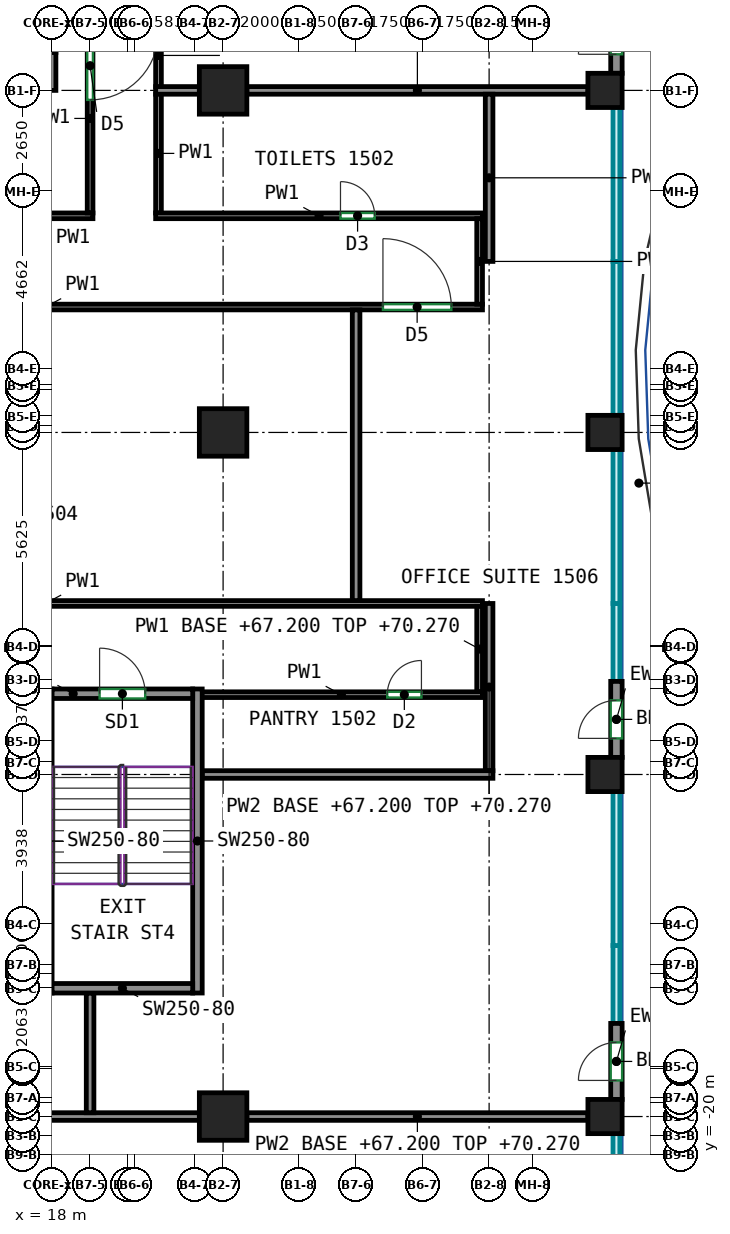
"""IFC4 building model, lengths in metres.
Left out: names, types, materials, properties, quantities, classifications, styles, units other than length and angle.
Written with IfcOpenShell. Run it as: python <this file> out.ifc"""

import sys

from ifc_helpers import new_model, si_unit, direction, frame, frame_2d, origin, origin_2d, place, context, subcontext, project, spatial, rectangle, extrude, source, transform, mapped, element, fill, save


model = new_model("IFC4")
c1 = context("Model", 3, precision=1e-05, world=origin(), true_north=direction((0.0, 1.0)))
c2 = subcontext(c1, "Body", "Model", "MODEL_VIEW")
j1 = project(units=[si_unit("LENGTHUNIT", "METRE"), si_unit("PLANEANGLEUNIT", "RADIAN")], contexts=[c1])
p1 = place(None, origin())
s1 = spatial("IfcSite", under=j1, at=p1, CompositionType="ELEMENT")
p2 = place(p1, origin())
s2 = spatial("IfcBuilding", under=s1, at=p2, CompositionType="ELEMENT")
p3 = place(p2, frame((0.0, 0.0, 67.2)))
s3 = spatial("IfcBuildingStorey", under=s2, at=p3, CompositionType="ELEMENT", Elevation=67.2)
m1 = source(origin(), c2, "Body", "SweptSolid", [
    extrude(rectangle(XDim=1.25, YDim=1.25, at=origin_2d()), origin(), (0.0, 0.0, 1.0), 3.72),
])
for number, where, z_axis, x_axis in (
    (1, (22.5, -19.0, 0.0), (0.0, 0.0, 1.0), (1.0, 0.0, 0.0)),
    (2, (22.5, -1.0, 0.0), (0.0, 0.0, 1.0), (1.0, 0.0, 0.0)),
    (3, (22.5, 8.0, 0.0), (0.0, 0.0, 1.0), (1.0, 0.0, 0.0)),
):
    element("IfcColumn", number, at=place(p3, frame(where, z_axis=z_axis, x_axis=x_axis)), inside=s3, PredefinedType="COLUMN", context=c2, shape_type="MappedRepresentation", body=[
        mapped(m1, transform((0.0, 0.0, 0.0))),
    ])
m2 = source(origin(), c2, "Body", "SweptSolid", [
    extrude(rectangle(XDim=0.9, YDim=0.9, at=origin_2d()), origin(), (0.0, 0.0, 1.0), 3.72),
])
for number, where, z_axis, x_axis in (
    (4, (32.55, -19.0, 0.0), (0.0, 0.0, 1.0), (1.0, 0.0, 0.0)),
    (5, (32.55, -10.0, 0.0), (0.0, 0.0, 1.0), (1.0, 0.0, 0.0)),
    (6, (32.55, -1.0, 0.0), (0.0, 0.0, 1.0), (1.0, 0.0, 0.0)),
    (7, (32.55, 8.0, 0.0), (0.0, 0.0, 1.0), (1.0, 0.0, 0.0)),
):
    element("IfcColumn", number, at=place(p3, frame(where, z_axis=z_axis, x_axis=x_axis)), inside=s3, PredefinedType="COLUMN", context=c2, shape_type="MappedRepresentation", body=[
        mapped(m2, transform((0.0, 0.0, 0.0))),
    ])
m3 = source(origin(), c2, "Body", "SweptSolid", [
    extrude(rectangle(XDim=5.63, YDim=1.0, at=frame_2d((2.815, 0.0))), origin(), (0.0, 0.0, 1.0), 3.72),
])
p4 = place(p3, frame((12.47, 8.5, 0.0), z_axis=(0.0, 0.0, 1.0), x_axis=(1.0, 0.0, 0.0)))
e8 = element("IfcWall", 8, at=p4, inside=s3, PredefinedType="SHEAR", context=c2, shape_type="MappedRepresentation", body=[
    mapped(m3, transform((0.0, 0.0, 0.0))),
])
p5 = place(p4, frame((2.18, 0.0, 0.0)))
e9 = element("IfcOpeningElement", 9, at=p5, cuts=e8, PredefinedType="OPENING", context=c2, shape_type="SweptSolid", body=[
    extrude(rectangle(XDim=1.2, YDim=2.1, at=frame_2d((0.6, 1.05))), frame((0.0, 0.51, 0.0), z_axis=(0.0, -1.0, 0.0), x_axis=(1.0, 0.0, 0.0)), (0.0, 0.0, 1.0), 1.02),
])
m4 = source(origin(), c2, "Body", "SweptSolid", [
    extrude(rectangle(XDim=8.0, YDim=0.25, at=frame_2d((4.0, 0.0))), origin(), (0.0, 0.0, 1.0), 3.72),
])
p6 = place(p3, frame((21.825, -15.75, 0.0), z_axis=(0.0, 0.0, 1.0), x_axis=(0.0, 1.0, 0.0)))
e10 = element("IfcWall", 10, at=p6, inside=s3, PredefinedType="SHEAR", context=c2, shape_type="MappedRepresentation", body=[
    mapped(m4, transform((0.0, 0.0, 0.0))),
])
m5 = source(origin(), c2, "Body", "SweptSolid", [
    extrude(rectangle(XDim=3.7, YDim=0.25, at=frame_2d((1.85, 0.0))), origin(), (0.0, 0.0, 1.0), 3.72),
])
p7 = place(p3, frame((18.0, -15.625, 0.0), z_axis=(0.0, 0.0, 1.0), x_axis=(1.0, 0.0, 0.0)))
e11 = element("IfcWall", 11, at=p7, inside=s3, PredefinedType="SHEAR", context=c2, shape_type="MappedRepresentation", body=[
    mapped(m5, transform((0.0, 0.0, 0.0))),
])
p8 = place(p3, frame((18.0, -7.875, 0.0), z_axis=(0.0, 0.0, 1.0), x_axis=(1.0, 0.0, 0.0)))
e12 = element("IfcWall", 12, at=p8, inside=s3, PredefinedType="SHEAR", context=c2, shape_type="MappedRepresentation", body=[
    mapped(m5, transform((0.0, 0.0, 0.0))),
])
p9 = place(p8, frame((1.25, 0.0, 0.0)))
e13 = element("IfcOpeningElement", 13, at=p9, cuts=e12, PredefinedType="OPENING", context=c2, shape_type="SweptSolid", body=[
    extrude(rectangle(XDim=1.2, YDim=2.1, at=frame_2d((0.6, 1.05))), frame((0.0, 0.135, 0.0), z_axis=(0.0, -1.0, 0.0), x_axis=(1.0, 0.0, 0.0)), (0.0, 0.0, 1.0), 0.27),
])
m6 = source(origin(), c2, "Body", "SweptSolid", [
    extrude(rectangle(XDim=2.0, YDim=0.3, at=frame_2d((1.0, 0.0))), origin(), (0.0, 0.0, 1.0), 3.72),
])
p10 = place(p3, frame((32.85, -18.55, 0.0), z_axis=(0.0, 0.0, 1.0), x_axis=(0.0, 1.0, 0.0)))
e14 = element("IfcWall", 14, at=p10, inside=s3, PredefinedType="SOLIDWALL", context=c2, shape_type="MappedRepresentation", body=[
    mapped(m6, transform((0.0, 0.0, 0.0))),
])
p11 = place(p10, frame((0.5, 0.0, 0.0)))
e15 = element("IfcOpeningElement", 15, at=p11, cuts=e14, PredefinedType="OPENING", context=c2, shape_type="SweptSolid", body=[
    extrude(rectangle(XDim=1.0, YDim=2.1, at=frame_2d((0.5, 1.05))), frame((0.0, 0.16, 0.0), z_axis=(0.0, -1.0, 0.0), x_axis=(1.0, 0.0, 0.0)), (0.0, 0.0, 1.0), 0.32),
])
p12 = place(p3, frame((32.85, -9.55, 0.0), z_axis=(0.0, 0.0, 1.0), x_axis=(0.0, 1.0, 0.0)))
e16 = element("IfcWall", 16, at=p12, inside=s3, PredefinedType="SOLIDWALL", context=c2, shape_type="MappedRepresentation", body=[
    mapped(m6, transform((0.0, 0.0, 0.0))),
])
p13 = place(p12, frame((0.5, 0.0, 0.0)))
e17 = element("IfcOpeningElement", 17, at=p13, cuts=e16, PredefinedType="OPENING", context=c2, shape_type="SweptSolid", body=[
    extrude(rectangle(XDim=1.0, YDim=2.1, at=frame_2d((0.5, 1.05))), frame((0.0, 0.16, 0.0), z_axis=(0.0, -1.0, 0.0), x_axis=(1.0, 0.0, 0.0)), (0.0, 0.0, 1.0), 0.32),
])
p14 = place(p3, frame((32.85, 8.45, 0.0), z_axis=(0.0, 0.0, 1.0), x_axis=(0.0, 1.0, 0.0)))
e18 = element("IfcWall", 18, at=p14, inside=s3, PredefinedType="SOLIDWALL", context=c2, shape_type="MappedRepresentation", body=[
    mapped(m6, transform((0.0, 0.0, 0.0))),
])
p15 = place(p14, frame((0.5, 0.0, 0.0)))
e19 = element("IfcOpeningElement", 19, at=p15, cuts=e18, PredefinedType="OPENING", context=c2, shape_type="SweptSolid", body=[
    extrude(rectangle(XDim=1.0, YDim=2.1, at=frame_2d((0.5, 1.05))), frame((0.0, 0.16, 0.0), z_axis=(0.0, -1.0, 0.0), x_axis=(1.0, 0.0, 0.0)), (0.0, 0.0, 1.0), 0.32),
])
p16 = place(p3, frame((6.325, 2.3, 0.0), z_axis=(0.0, 0.0, 1.0), x_axis=(1.0, 0.0, 0.0)))
e20 = element("IfcWall", 20, at=p16, inside=s3, PredefinedType="PARTITIONING", context=c2, shape_type="SweptSolid", body=[
    extrude(rectangle(XDim=23.0, YDim=0.15, at=frame_2d((11.5, 0.0))), origin(), (0.0, 0.0, 1.0), 3.72),
])
p17 = place(p16, frame((9.443, 0.0, 0.0)))
e21 = element("IfcOpeningElement", 21, at=p17, cuts=e20, PredefinedType="OPENING", context=c2, shape_type="SweptSolid", body=[
    extrude(rectangle(XDim=1.0, YDim=2.1, at=frame_2d((0.5, 1.05))), frame((0.0, 0.085, 0.0), z_axis=(0.0, -1.0, 0.0), x_axis=(1.0, 0.0, 0.0)), (0.0, 0.0, 1.0), 0.17),
])
p18 = place(p16, frame((20.381, 0.0, 0.0)))
e22 = element("IfcOpeningElement", 22, at=p18, cuts=e20, PredefinedType="OPENING", context=c2, shape_type="SweptSolid", body=[
    extrude(rectangle(XDim=1.8, YDim=2.1, at=frame_2d((0.9, 1.05))), frame((0.0, 0.085, 0.0), z_axis=(0.0, -1.0, 0.0), x_axis=(1.0, 0.0, 0.0)), (0.0, 0.0, 1.0), 0.17),
])
p19 = place(p3, frame((6.325, -5.5, 0.0), z_axis=(0.0, 0.0, 1.0), x_axis=(1.0, 0.0, 0.0)))
e23 = element("IfcWall", 23, at=p19, inside=s3, PredefinedType="PARTITIONING", context=c2, shape_type="SweptSolid", body=[
    extrude(rectangle(XDim=23.0, YDim=0.15, at=frame_2d((11.5, 0.0))), origin(), (0.0, 0.0, 1.0), 3.72),
])
p20 = place(p3, frame((16.075, 4.7, 0.0), z_axis=(0.0, 0.0, 1.0), x_axis=(1.0, 0.0, 0.0)))
e24 = element("IfcWall", 24, at=p20, inside=s3, PredefinedType="PARTITIONING", context=c2, shape_type="SweptSolid", body=[
    extrude(rectangle(XDim=3.0, YDim=0.15, at=frame_2d((1.5, 0.0))), origin(), (0.0, 0.0, 1.0), 3.72),
])
p21 = place(p3, frame((19.0, 9.75, 0.0), z_axis=(0.0, 0.0, 1.0), x_axis=(0.0, -1.0, 0.0)))
e25 = element("IfcWall", 25, at=p21, inside=s3, PredefinedType="PARTITIONING", context=c2, shape_type="SweptSolid", body=[
    extrude(rectangle(XDim=4.975, YDim=0.15, at=frame_2d((2.488, 0.0))), origin(), (0.0, 0.0, 1.0), 3.72),
])
p22 = place(p21, frame((0.2, 0.0, 0.0)))
e26 = element("IfcOpeningElement", 26, at=p22, cuts=e25, PredefinedType="OPENING", context=c2, shape_type="SweptSolid", body=[
    extrude(rectangle(XDim=1.8, YDim=2.1, at=frame_2d((0.9, 1.05))), frame((0.0, 0.085, 0.0), z_axis=(0.0, -1.0, 0.0), x_axis=(1.0, 0.0, 0.0)), (0.0, 0.0, 1.0), 0.17),
])
p23 = place(p3, frame((20.8, 8.09, 0.0), z_axis=(0.0, 0.0, 1.0), x_axis=(0.0, 1.0, 0.0)))
e27 = element("IfcWall", 27, at=p23, inside=s3, PredefinedType="PARTITIONING", context=c2, shape_type="SweptSolid", body=[
    extrude(rectangle(XDim=1.66, YDim=0.15, at=frame_2d((0.83, 0.0))), origin(), (0.0, 0.0, 1.0), 3.72),
])
p24 = place(p3, frame((20.8, 4.775, 0.0), z_axis=(0.0, 0.0, 1.0), x_axis=(0.0, 1.0, 0.0)))
e28 = element("IfcWall", 28, at=p24, inside=s3, PredefinedType="PARTITIONING", context=c2, shape_type="SweptSolid", body=[
    extrude(rectangle(XDim=3.135, YDim=0.15, at=frame_2d((1.567, 0.0))), origin(), (0.0, 0.0, 1.0), 3.72),
])
p25 = place(p3, frame((20.725, 4.7, 0.0), z_axis=(0.0, 0.0, 1.0), x_axis=(1.0, 0.0, 0.0)))
e29 = element("IfcWall", 29, at=p25, inside=s3, PredefinedType="PARTITIONING", context=c2, shape_type="SweptSolid", body=[
    extrude(rectangle(XDim=8.6, YDim=0.15, at=frame_2d((4.3, 0.0))), origin(), (0.0, 0.0, 1.0), 3.72),
])
p26 = place(p25, frame((4.864, 0.0, 0.0)))
e30 = element("IfcOpeningElement", 30, at=p26, cuts=e29, PredefinedType="OPENING", context=c2, shape_type="SweptSolid", body=[
    extrude(rectangle(XDim=0.9, YDim=2.1, at=frame_2d((0.45, 1.05))), frame((0.0, 0.085, 0.0), z_axis=(0.0, -1.0, 0.0), x_axis=(1.0, 0.0, 0.0)), (0.0, 0.0, 1.0), 0.17),
])
p27 = place(p3, frame((29.25, -7.825, 0.0), z_axis=(0.0, 0.0, 1.0), x_axis=(0.0, 1.0, 0.0)))
e31 = element("IfcWall", 31, at=p27, inside=s3, PredefinedType="PARTITIONING", context=c2, shape_type="SweptSolid", body=[
    extrude(rectangle(XDim=2.25, YDim=0.15, at=frame_2d((1.125, 0.0))), origin(), (0.0, 0.0, 1.0), 3.07),
])
p28 = place(p3, frame((21.9, -7.9, 0.0), z_axis=(0.0, 0.0, 1.0), x_axis=(1.0, 0.0, 0.0)))
e32 = element("IfcWall", 32, at=p28, inside=s3, PredefinedType="PARTITIONING", context=c2, shape_type="SweptSolid", body=[
    extrude(rectangle(XDim=7.425, YDim=0.15, at=frame_2d((3.712, 0.0))), origin(), (0.0, 0.0, 1.0), 3.72),
])
p29 = place(p28, frame((4.919, 0.0, 0.0)))
e33 = element("IfcOpeningElement", 33, at=p29, cuts=e32, PredefinedType="OPENING", context=c2, shape_type="SweptSolid", body=[
    extrude(rectangle(XDim=0.9, YDim=2.1, at=frame_2d((0.45, 1.05))), frame((0.0, 0.085, 0.0), z_axis=(0.0, -1.0, 0.0), x_axis=(1.0, 0.0, 0.0)), (0.0, 0.0, 1.0), 0.17),
])
p30 = place(p3, frame((29.25, 2.375, 0.0), z_axis=(0.0, 0.0, 1.0), x_axis=(0.0, 1.0, 0.0)))
e34 = element("IfcWall", 34, at=p30, inside=s3, PredefinedType="PARTITIONING", context=c2, shape_type="SweptSolid", body=[
    extrude(rectangle(XDim=2.25, YDim=0.15, at=frame_2d((1.125, 0.0))), origin(), (0.0, 0.0, 1.0), 3.07),
])
p31 = place(p3, frame((16.125, -19.0, 0.0), z_axis=(0.0, 0.0, 1.0), x_axis=(1.0, 0.0, 0.0)))
e35 = element("IfcWall", 35, at=p31, inside=s3, PredefinedType="PARTITIONING", context=c2, shape_type="SweptSolid", body=[
    extrude(rectangle(XDim=5.75, YDim=0.2, at=frame_2d((2.875, 0.0))), origin(), (0.0, 0.0, 1.0), 3.72),
])
p32 = place(p3, frame((23.125, -19.0, 0.0), z_axis=(0.0, 0.0, 1.0), x_axis=(1.0, 0.0, 0.0)))
e36 = element("IfcWall", 36, at=p32, inside=s3, PredefinedType="PARTITIONING", context=c2, shape_type="SweptSolid", body=[
    extrude(rectangle(XDim=8.975, YDim=0.2, at=frame_2d((4.488, 0.0))), origin(), (0.0, 0.0, 1.0), 3.07),
])
p33 = place(p3, frame((26.0, -5.424, 0.0), z_axis=(0.0, 0.0, 1.0), x_axis=(0.0, 1.0, 0.0)))
e37 = element("IfcWall", 37, at=p33, inside=s3, PredefinedType="PARTITIONING", context=c2, shape_type="SweptSolid", body=[
    extrude(rectangle(XDim=7.648, YDim=0.2, at=frame_2d((3.824, 0.0))), origin(), (0.0, 0.0, 1.0), 3.72),
])
p34 = place(p3, frame((19.0, -18.9, 0.0), z_axis=(0.0, 0.0, 1.0), x_axis=(0.0, 1.0, 0.0)))
e38 = element("IfcWall", 38, at=p34, inside=s3, PredefinedType="PARTITIONING", context=c2, shape_type="SweptSolid", body=[
    extrude(rectangle(XDim=3.15, YDim=0.2, at=frame_2d((1.575, 0.0))), origin(), (0.0, 0.0, 1.0), 3.72),
])
p35 = place(p3, frame((23.125, 8.0, 0.0), z_axis=(0.0, 0.0, 1.0), x_axis=(1.0, 0.0, 0.0)))
e39 = element("IfcWall", 39, at=p35, inside=s3, PredefinedType="PARTITIONING", context=c2, shape_type="SweptSolid", body=[
    extrude(rectangle(XDim=8.975, YDim=0.2, at=frame_2d((4.488, 0.0))), origin(), (0.0, 0.0, 1.0), 3.07),
])
p36 = place(p3, frame((20.726, 8.0, 0.0), z_axis=(0.0, 0.0, 1.0), x_axis=(1.0, 0.0, 0.0)))
e40 = element("IfcWall", 40, at=p36, inside=s3, PredefinedType="PARTITIONING", context=c2, shape_type="SweptSolid", body=[
    extrude(rectangle(XDim=1.149, YDim=0.2, at=frame_2d((0.574, 0.0))), origin(), (0.0, 0.0, 1.0), 3.72),
])
for number, where, z_axis, x_axis in (
    (41, (29.5, 3.5, 0.0), (0.0, 0.0, 1.0), (0.0, 1.0, 0.0)),
    (42, (29.5, -9.9, 0.0), (0.0, 0.0, 1.0), (0.0, 1.0, 0.0)),
):
    element("IfcWall", number, at=place(p3, frame(where, z_axis=z_axis, x_axis=x_axis)), inside=s3, PredefinedType="PARTITIONING", context=c2, shape_type="SweptSolid", body=[
        extrude(rectangle(XDim=4.4, YDim=0.2, at=frame_2d((2.2, 0.0))), origin(), (0.0, 0.0, 1.0), 3.07),
    ])
p37 = place(p3, frame((21.95, -10.0, 0.0), z_axis=(0.0, 0.0, 1.0), x_axis=(1.0, 0.0, 0.0)))
e43 = element("IfcWall", 43, at=p37, inside=s3, PredefinedType="PARTITIONING", context=c2, shape_type="SweptSolid", body=[
    extrude(rectangle(XDim=7.65, YDim=0.2, at=frame_2d((3.825, 0.0))), origin(), (0.0, 0.0, 1.0), 3.72),
])
p38 = place(p11, origin())
e44 = element("IfcDoor", 44, at=p38, inside=s3, OperationType="SINGLE_SWING_LEFT", PredefinedType="DOOR", context=c2, shape_type="SweptSolid", body=[
    extrude(rectangle(XDim=1.0, YDim=2.1, at=frame_2d((0.5, 1.05))), frame((0.0, 0.025, 0.0), z_axis=(0.0, -1.0, 0.0), x_axis=(1.0, 0.0, 0.0)), (0.0, 0.0, 1.0), 0.05),
])
fill(e15, e44)
p39 = place(p13, origin())
e45 = element("IfcDoor", 45, at=p39, inside=s3, OperationType="SINGLE_SWING_LEFT", PredefinedType="DOOR", context=c2, shape_type="SweptSolid", body=[
    extrude(rectangle(XDim=1.0, YDim=2.1, at=frame_2d((0.5, 1.05))), frame((0.0, 0.025, 0.0), z_axis=(0.0, -1.0, 0.0), x_axis=(1.0, 0.0, 0.0)), (0.0, 0.0, 1.0), 0.05),
])
fill(e17, e45)
p40 = place(p15, origin())
e46 = element("IfcDoor", 46, at=p40, inside=s3, OperationType="SINGLE_SWING_LEFT", PredefinedType="DOOR", context=c2, shape_type="SweptSolid", body=[
    extrude(rectangle(XDim=1.0, YDim=2.1, at=frame_2d((0.5, 1.05))), frame((0.0, 0.025, 0.0), z_axis=(0.0, -1.0, 0.0), x_axis=(1.0, 0.0, 0.0)), (0.0, 0.0, 1.0), 0.05),
])
fill(e19, e46)
p41 = place(p9, origin())
e47 = element("IfcDoor", 47, at=p41, inside=s3, OperationType="DOUBLE_DOOR_SINGLE_SWING", PredefinedType="DOOR", context=c2, shape_type="SweptSolid", body=[
    extrude(rectangle(XDim=1.2, YDim=2.1, at=frame_2d((0.6, 1.05))), frame((0.0, 0.025, 0.0), z_axis=(0.0, -1.0, 0.0), x_axis=(1.0, 0.0, 0.0)), (0.0, 0.0, 1.0), 0.05),
])
fill(e13, e47)
p42 = place(p29, origin())
e48 = element("IfcDoor", 48, at=p42, inside=s3, OperationType="SINGLE_SWING_RIGHT", PredefinedType="DOOR", context=c2, shape_type="SweptSolid", body=[
    extrude(rectangle(XDim=0.9, YDim=2.1, at=frame_2d((0.45, 1.05))), frame((0.0, 0.025, 0.0), z_axis=(0.0, -1.0, 0.0), x_axis=(1.0, 0.0, 0.0)), (0.0, 0.0, 1.0), 0.05),
])
fill(e33, e48)
p43 = place(p18, origin())
e49 = element("IfcDoor", 49, at=p43, inside=s3, OperationType="DOUBLE_DOOR_SINGLE_SWING", PredefinedType="DOOR", context=c2, shape_type="SweptSolid", body=[
    extrude(rectangle(XDim=1.8, YDim=2.1, at=frame_2d((0.9, 1.05))), frame((0.0, 0.025, 0.0), z_axis=(0.0, -1.0, 0.0), x_axis=(1.0, 0.0, 0.0)), (0.0, 0.0, 1.0), 0.05),
])
fill(e22, e49)
p44 = place(p26, origin())
e50 = element("IfcDoor", 50, at=p44, inside=s3, OperationType="SINGLE_SWING_LEFT", PredefinedType="DOOR", context=c2, shape_type="SweptSolid", body=[
    extrude(rectangle(XDim=0.9, YDim=2.1, at=frame_2d((0.45, 1.05))), frame((0.0, 0.025, 0.0), z_axis=(0.0, -1.0, 0.0), x_axis=(1.0, 0.0, 0.0)), (0.0, 0.0, 1.0), 0.05),
])
fill(e30, e50)
p45 = place(p22, origin())
e51 = element("IfcDoor", 51, at=p45, inside=s3, OperationType="DOUBLE_DOOR_SINGLE_SWING", PredefinedType="DOOR", context=c2, shape_type="SweptSolid", body=[
    extrude(rectangle(XDim=1.8, YDim=2.1, at=frame_2d((0.9, 1.05))), frame((0.0, 0.025, 0.0), z_axis=(0.0, -1.0, 0.0), x_axis=(1.0, 0.0, 0.0)), (0.0, 0.0, 1.0), 0.05),
])
fill(e26, e51)
save(model, sys.argv[1])
